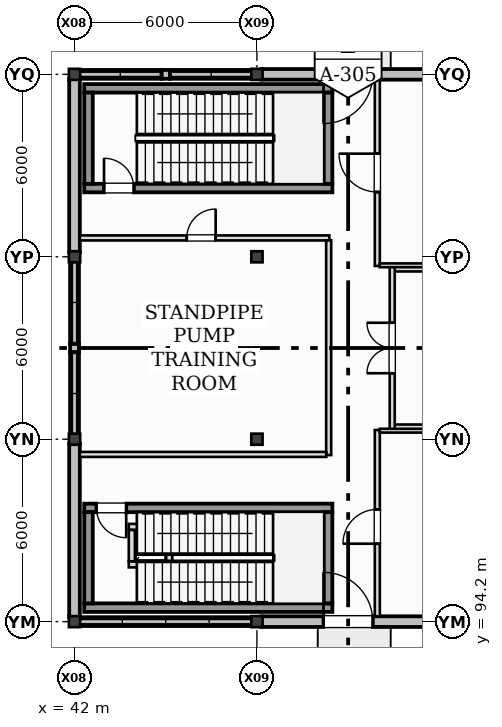
"""IFC4 building model, lengths in metres.
Left out: names, types, materials, properties, quantities, classifications, styles, units other than length and angle.
Written with IfcOpenShell. Run it as: python <this file> out.ifc"""

import sys

from ifc_helpers import new_model, si_unit, direction, frame, frame_2d, origin, origin_2d, place, context, subcontext, project, spatial, rectangle, i_section, extrude, element, fill, save


model = new_model("IFC4")
c1 = context("Model", 3, precision=1e-05, world=origin(), true_north=direction((0.0, 1.0)))
c2 = subcontext(c1, "Body", "Model", "MODEL_VIEW")
j1 = project(units=[si_unit("LENGTHUNIT", "METRE"), si_unit("PLANEANGLEUNIT", "RADIAN")], contexts=[c1])
p1 = place(None, origin())
s1 = spatial("IfcSite", under=j1, at=p1, CompositionType="ELEMENT")
p2 = place(p1, origin())
s2 = spatial("IfcBuilding", under=s1, at=p2, CompositionType="ELEMENT")
p3 = place(p2, origin())
s3 = spatial("IfcBuildingStorey", under=s2, at=p3, CompositionType="ELEMENT", Elevation=0.0)
for number, where, z_axis, x_axis in (
    (1, (42.0, 94.2, -0.41), (0.0, 0.0, 1.0), (1.0, 0.0, 0.0)),
    (2, (42.0, 100.2, -0.41), (0.0, 0.0, 1.0), (1.0, 0.0, 0.0)),
    (3, (42.0, 106.2, -0.41), (0.0, 0.0, 1.0), (1.0, 0.0, 0.0)),
    (4, (42.0, 112.2, -0.41), (0.0, 0.0, 1.0), (1.0, 0.0, 0.0)),
    (5, (48.0, 94.2, -0.41), (0.0, 0.0, 1.0), (1.0, 0.0, 0.0)),
    (6, (48.0, 100.2, -0.41), (0.0, 0.0, 1.0), (1.0, 0.0, 0.0)),
    (7, (48.0, 106.2, -0.41), (0.0, 0.0, 1.0), (1.0, 0.0, 0.0)),
    (8, (48.0, 112.2, -0.41), (0.0, 0.0, 1.0), (1.0, 0.0, 0.0)),
):
    element("IfcColumn", number, at=place(p3, frame(where, z_axis=z_axis, x_axis=x_axis)), inside=s3, PredefinedType="COLUMN", context=c2, shape_type="SweptSolid", body=[
        extrude(i_section(OverallWidth=0.371, OverallDepth=0.364, WebThickness=0.013, FlangeThickness=0.022, at=origin_2d()), origin(), (0.0, 0.0, 1.0), 6.41),
    ])
p4 = place(p3, frame((42.145, 94.2, 0.0), z_axis=(0.0, 0.0, 1.0), x_axis=(1.0, 0.0, 0.0)))
e9 = element("IfcWall", 9, at=p4, inside=s3, PredefinedType="STANDARD", context=c2, shape_type="SweptSolid", body=[
    extrude(rectangle(XDim=5.71, YDim=0.29, at=frame_2d((2.855, 0.0))), origin(), (0.0, 0.0, 1.0), 0.56),
])
p5 = place(p3, frame((48.145, 94.2, 0.0), z_axis=(0.0, 0.0, 1.0), x_axis=(1.0, 0.0, 0.0)))
e10 = element("IfcWall", 10, at=p5, inside=s3, PredefinedType="STANDARD", context=c2, shape_type="SweptSolid", body=[
    extrude(rectangle(XDim=5.71, YDim=0.35, at=frame_2d((2.855, 0.0))), origin(), (0.0, 0.0, 1.0), 5.113),
])
p6 = place(p5, frame((2.045, 0.0, 0.0)))
e11 = element("IfcOpeningElement", 11, at=p6, cuts=e10, PredefinedType="OPENING", context=c2, shape_type="SweptSolid", body=[
    extrude(rectangle(XDim=1.62, YDim=2.2, at=frame_2d((0.81, 1.1))), frame((0.0, 0.185, 0.0), z_axis=(0.0, -1.0, 0.0), x_axis=(1.0, 0.0, 0.0)), (0.0, 0.0, 1.0), 0.37),
])
p7 = place(p3, frame((45.14, 112.2, 0.0), z_axis=(0.0, 0.0, 1.0), x_axis=(-1.0, 0.0, 0.0)))
e12 = element("IfcWall", 12, at=p7, inside=s3, PredefinedType="STANDARD", context=c2, shape_type="SweptSolid", body=[
    extrude(rectangle(XDim=0.28, YDim=0.29, at=frame_2d((0.14, 0.0))), origin(), (0.0, 0.0, 1.0), 5.113),
])
p8 = place(p3, frame((47.855, 112.2, 0.0), z_axis=(0.0, 0.0, 1.0), x_axis=(-1.0, 0.0, 0.0)))
e13 = element("IfcWall", 13, at=p8, inside=s3, PredefinedType="STANDARD", context=c2, shape_type="SweptSolid", body=[
    extrude(rectangle(XDim=2.715, YDim=0.29, at=frame_2d((1.357, 0.0))), origin(), (0.0, 0.0, 1.0), 0.68),
])
p9 = place(p3, frame((44.86, 112.2, 0.0), z_axis=(0.0, 0.0, 1.0), x_axis=(-1.0, 0.0, 0.0)))
e14 = element("IfcWall", 14, at=p9, inside=s3, PredefinedType="STANDARD", context=c2, shape_type="SweptSolid", body=[
    extrude(rectangle(XDim=2.715, YDim=0.29, at=frame_2d((1.357, 0.0))), origin(), (0.0, 0.0, 1.0), 0.8),
])
p10 = place(p3, frame((53.855, 112.2, 0.0), z_axis=(0.0, 0.0, 1.0), x_axis=(-1.0, 0.0, 0.0)))
e15 = element("IfcWall", 15, at=p10, inside=s3, PredefinedType="STANDARD", context=c2, shape_type="SweptSolid", body=[
    extrude(rectangle(XDim=5.71, YDim=0.35, at=frame_2d((2.855, 0.0))), origin(), (0.0, 0.0, 1.0), 5.113),
])
p11 = place(p10, frame((2.045, 0.0, 0.0)))
e16 = element("IfcOpeningElement", 16, at=p11, cuts=e15, PredefinedType="OPENING", context=c2, shape_type="SweptSolid", body=[
    extrude(rectangle(XDim=1.62, YDim=2.2, at=frame_2d((0.81, 1.1))), frame((0.0, 0.185, 0.0), z_axis=(0.0, -1.0, 0.0), x_axis=(1.0, 0.0, 0.0)), (0.0, 0.0, 1.0), 0.37),
])
p12 = place(p3, frame((42.0, 100.055, 0.0), z_axis=(0.0, 0.0, 1.0), x_axis=(0.0, -1.0, 0.0)))
e17 = element("IfcWall", 17, at=p12, inside=s3, PredefinedType="STANDARD", context=c2, shape_type="SweptSolid", body=[
    extrude(rectangle(XDim=5.71, YDim=0.35, at=frame_2d((2.855, 0.0))), origin(), (0.0, 0.0, 1.0), 5.044),
])
p13 = place(p3, frame((42.0, 103.34, 0.0), z_axis=(0.0, 0.0, 1.0), x_axis=(0.0, -1.0, 0.0)))
e18 = element("IfcWall", 18, at=p13, inside=s3, PredefinedType="STANDARD", context=c2, shape_type="SweptSolid", body=[
    extrude(rectangle(XDim=0.28, YDim=0.29, at=frame_2d((0.14, 0.0))), origin(), (0.0, 0.0, 1.0), 5.044),
])
p14 = place(p3, frame((42.0, 106.055, 0.0), z_axis=(0.0, 0.0, 1.0), x_axis=(0.0, -1.0, 0.0)))
e19 = element("IfcWall", 19, at=p14, inside=s3, PredefinedType="STANDARD", context=c2, shape_type="SweptSolid", body=[
    extrude(rectangle(XDim=2.715, YDim=0.29, at=frame_2d((1.357, 0.0))), origin(), (0.0, 0.0, 1.0), 0.92),
])
p15 = place(p3, frame((42.0, 103.06, 0.0), z_axis=(0.0, 0.0, 1.0), x_axis=(0.0, -1.0, 0.0)))
e20 = element("IfcWall", 20, at=p15, inside=s3, PredefinedType="STANDARD", context=c2, shape_type="SweptSolid", body=[
    extrude(rectangle(XDim=2.715, YDim=0.29, at=frame_2d((1.357, 0.0))), origin(), (0.0, 0.0, 1.0), 0.32),
])
p16 = place(p3, frame((42.0, 112.055, 0.0), z_axis=(0.0, 0.0, 1.0), x_axis=(0.0, -1.0, 0.0)))
e21 = element("IfcWall", 21, at=p16, inside=s3, PredefinedType="STANDARD", context=c2, shape_type="SweptSolid", body=[
    extrude(rectangle(XDim=5.71, YDim=0.35, at=frame_2d((2.855, 0.0))), origin(), (0.0, 0.0, 1.0), 5.044),
])
p17 = place(p3, frame((42.32, 94.66, 0.0), z_axis=(0.0, 0.0, 1.0), x_axis=(1.0, 0.0, 0.0)))
e22 = element("IfcWall", 22, at=p17, inside=s3, PredefinedType="SHEAR", context=c2, shape_type="SweptSolid", body=[
    extrude(rectangle(XDim=8.16, YDim=0.28, at=frame_2d((4.08, 0.0))), origin(), (0.0, 0.0, 1.0), 6.0),
])
p18 = place(p3, frame((50.48, 97.94, 0.0), z_axis=(0.0, 0.0, 1.0), x_axis=(-1.0, 0.0, 0.0)))
e23 = element("IfcWall", 23, at=p18, inside=s3, PredefinedType="SHEAR", context=c2, shape_type="SweptSolid", body=[
    extrude(rectangle(XDim=8.16, YDim=0.28, at=frame_2d((4.08, 0.0))), origin(), (0.0, 0.0, 1.0), 6.0),
])
p19 = place(p18, frame((6.78, 0.0, 0.0)))
e24 = element("IfcOpeningElement", 24, at=p19, cuts=e23, PredefinedType="OPENING", context=c2, shape_type="SweptSolid", body=[
    extrude(rectangle(XDim=0.98, YDim=2.15, at=frame_2d((0.49, 1.075))), frame((0.0, 0.15, 0.0), z_axis=(0.0, -1.0, 0.0), x_axis=(1.0, 0.0, 0.0)), (0.0, 0.0, 1.0), 0.3),
])
for number, where, z_axis, x_axis in (
    (25, (42.46, 97.8, 0.0), (0.0, 0.0, 1.0), (0.0, -1.0, 0.0)),
    (26, (50.34, 94.8, 0.0), (0.0, 0.0, 1.0), (0.0, 1.0, 0.0)),
):
    element("IfcWall", number, at=place(p3, frame(where, z_axis=z_axis, x_axis=x_axis)), inside=s3, PredefinedType="SHEAR", context=c2, shape_type="SweptSolid", body=[
        extrude(rectangle(XDim=3.0, YDim=0.28, at=frame_2d((1.5, 0.0))), origin(), (0.0, 0.0, 1.0), 6.0),
    ])
p20 = place(p3, frame((42.32, 108.46, 0.0), z_axis=(0.0, 0.0, 1.0), x_axis=(1.0, 0.0, 0.0)))
e27 = element("IfcWall", 27, at=p20, inside=s3, PredefinedType="SHEAR", context=c2, shape_type="SweptSolid", body=[
    extrude(rectangle(XDim=8.16, YDim=0.28, at=frame_2d((4.08, 0.0))), origin(), (0.0, 0.0, 1.0), 6.0),
])
p21 = place(p20, frame((0.65, 0.0, 0.0)))
e28 = element("IfcOpeningElement", 28, at=p21, cuts=e27, PredefinedType="OPENING", context=c2, shape_type="SweptSolid", body=[
    extrude(rectangle(XDim=0.98, YDim=2.15, at=frame_2d((0.49, 1.075))), frame((0.0, 0.15, 0.0), z_axis=(0.0, -1.0, 0.0), x_axis=(1.0, 0.0, 0.0)), (0.0, 0.0, 1.0), 0.3),
])
p22 = place(p3, frame((50.48, 111.74, 0.0), z_axis=(0.0, 0.0, 1.0), x_axis=(-1.0, 0.0, 0.0)))
e29 = element("IfcWall", 29, at=p22, inside=s3, PredefinedType="SHEAR", context=c2, shape_type="SweptSolid", body=[
    extrude(rectangle(XDim=8.16, YDim=0.28, at=frame_2d((4.08, 0.0))), origin(), (0.0, 0.0, 1.0), 6.0),
])
for number, where, z_axis, x_axis in (
    (30, (42.46, 111.6, 0.0), (0.0, 0.0, 1.0), (0.0, -1.0, 0.0)),
    (31, (50.34, 108.6, 0.0), (0.0, 0.0, 1.0), (0.0, 1.0, 0.0)),
):
    element("IfcWall", number, at=place(p3, frame(where, z_axis=z_axis, x_axis=x_axis)), inside=s3, PredefinedType="SHEAR", context=c2, shape_type="SweptSolid", body=[
        extrude(rectangle(XDim=3.0, YDim=0.28, at=frame_2d((1.5, 0.0))), origin(), (0.0, 0.0, 1.0), 6.0),
    ])
for number, where, z_axis, x_axis in (
    (32, (52.45, 100.6, 0.0), (0.0, 0.0, 1.0), (1.0, 0.0, 0.0)),
    (33, (56.448, 105.8, 0.0), (0.0, 0.0, 1.0), (-1.0, 0.0, 0.0)),
):
    element("IfcWall", number, at=place(p3, frame(where, z_axis=z_axis, x_axis=x_axis)), inside=s3, PredefinedType="PARTITIONING", context=c2, shape_type="SweptSolid", body=[
        extrude(rectangle(XDim=3.998, YDim=0.165, at=frame_2d((1.999, 0.0))), origin(), (0.0, 0.0, 1.0), 5.68),
    ])
p23 = place(p3, frame((52.45, 100.52, 0.0), z_axis=(0.0, 0.0, 1.0), x_axis=(0.0, 1.0, 0.0)))
e34 = element("IfcWall", 34, at=p23, inside=s3, PredefinedType="PARTITIONING", context=c2, shape_type="SweptSolid", body=[
    extrude(rectangle(XDim=5.36, YDim=0.165, at=frame_2d((2.68, 0.0))), origin(), (0.0, 0.0, 1.0), 5.68),
])
p24 = place(p23, frame((1.85, 0.0, 0.0)))
e35 = element("IfcOpeningElement", 35, at=p24, cuts=e34, PredefinedType="OPENING", context=c2, shape_type="SweptSolid", body=[
    extrude(rectangle(XDim=1.66, YDim=2.2, at=frame_2d((0.83, 1.1))), frame((0.0, 0.093, 0.0), z_axis=(0.0, -1.0, 0.0), x_axis=(1.0, 0.0, 0.0)), (0.0, 0.0, 1.0), 0.185),
])
p25 = place(p3, frame((43.785, 96.085, 0.0), z_axis=(0.0, 0.0, 1.0), x_axis=(1.0, 0.0, 0.0)))
e36 = element("IfcWall", 36, at=p25, inside=s3, PredefinedType="PARTITIONING", context=c2, shape_type="SweptSolid", body=[
    extrude(rectangle(XDim=1.43, YDim=0.2, at=frame_2d((0.715, 0.0))), origin(), (0.0, 0.0, 1.0), 5.68),
])
p26 = place(p3, frame((45.115, 96.185, 0.0), z_axis=(0.0, 0.0, 1.0), x_axis=(0.0, 1.0, 0.0)))
e37 = element("IfcWall", 37, at=p26, inside=s3, PredefinedType="PARTITIONING", context=c2, shape_type="SweptSolid", body=[
    extrude(rectangle(XDim=1.03, YDim=0.2, at=frame_2d((0.515, 0.0))), origin(), (0.0, 0.0, 1.0), 5.68),
])
p27 = place(p3, frame((45.215, 97.315, 0.0), z_axis=(0.0, 0.0, 1.0), x_axis=(-1.0, 0.0, 0.0)))
e38 = element("IfcWall", 38, at=p27, inside=s3, PredefinedType="PARTITIONING", context=c2, shape_type="SweptSolid", body=[
    extrude(rectangle(XDim=1.43, YDim=0.2, at=frame_2d((0.715, 0.0))), origin(), (0.0, 0.0, 1.0), 5.68),
])
p28 = place(p3, frame((43.885, 97.215, 0.0), z_axis=(0.0, 0.0, 1.0), x_axis=(0.0, -1.0, 0.0)))
e39 = element("IfcWall", 39, at=p28, inside=s3, PredefinedType="PARTITIONING", context=c2, shape_type="SweptSolid", body=[
    extrude(rectangle(XDim=1.03, YDim=0.2, at=frame_2d((0.515, 0.0))), origin(), (0.0, 0.0, 1.0), 5.451),
])
p29 = place(p3, frame((42.175, 106.82, 0.0), z_axis=(0.0, 0.0, 1.0), x_axis=(1.0, 0.0, 0.0)))
e40 = element("IfcWall", 40, at=p29, inside=s3, PredefinedType="PARTITIONING", context=c2, shape_type="SweptSolid", body=[
    extrude(rectangle(XDim=8.208, YDim=0.165, at=frame_2d((4.104, 0.0))), origin(), (0.0, 0.0, 1.0), 5.68),
])
p30 = place(p29, frame((3.517, 0.0, 0.0)))
e41 = element("IfcOpeningElement", 41, at=p30, cuts=e40, PredefinedType="OPENING", context=c2, shape_type="SweptSolid", body=[
    extrude(rectangle(XDim=0.95, YDim=2.12, at=frame_2d((0.475, 1.06))), frame((0.0, 0.093, 0.0), z_axis=(0.0, -1.0, 0.0), x_axis=(1.0, 0.0, 0.0)), (0.0, 0.0, 1.0), 0.185),
])
p31 = place(p3, frame((50.36, 106.74, 0.0), z_axis=(0.0, 0.0, 1.0), x_axis=(0.0, -1.0, 0.0)))
e42 = element("IfcWall", 42, at=p31, inside=s3, PredefinedType="PARTITIONING", context=c2, shape_type="SweptSolid", body=[
    extrude(rectangle(XDim=7.062, YDim=0.165, at=frame_2d((3.531, 0.0))), origin(), (0.0, 0.0, 1.0), 5.68),
])
p32 = place(p3, frame((50.28, 99.7, 0.0), z_axis=(0.0, 0.0, 1.0), x_axis=(-1.0, 0.0, 0.0)))
e43 = element("IfcWall", 43, at=p32, inside=s3, PredefinedType="PARTITIONING", context=c2, shape_type="SweptSolid", body=[
    extrude(rectangle(XDim=8.105, YDim=0.165, at=frame_2d((4.052, 0.0))), origin(), (0.0, 0.0, 1.0), 5.68),
])
p33 = place(p3, frame((51.96, 94.375, 0.0), z_axis=(0.0, 0.0, 1.0), x_axis=(0.0, 1.0, 0.0)))
e44 = element("IfcWall", 44, at=p33, inside=s3, PredefinedType="PARTITIONING", context=c2, shape_type="SweptSolid", body=[
    extrude(rectangle(XDim=6.127, YDim=0.165, at=frame_2d((3.064, 0.0))), origin(), (0.0, 0.0, 1.0), 5.249),
])
p34 = place(p33, frame((2.387, 0.0, 0.0)))
e45 = element("IfcOpeningElement", 45, at=p34, cuts=e44, PredefinedType="OPENING", context=c2, shape_type="SweptSolid", body=[
    extrude(rectangle(XDim=1.13, YDim=2.18, at=frame_2d((0.565, 1.09))), frame((0.0, 0.093, 0.0), z_axis=(0.0, -1.0, 0.0), x_axis=(1.0, 0.0, 0.0)), (0.0, 0.0, 1.0), 0.185),
])
p35 = place(p3, frame((52.04, 100.48, 0.0), z_axis=(0.0, 0.0, 1.0), x_axis=(1.0, 0.0, 0.0)))
e46 = element("IfcWall", 46, at=p35, inside=s3, PredefinedType="PARTITIONING", context=c2, shape_type="SweptSolid", body=[
    extrude(rectangle(XDim=7.815, YDim=0.125, at=frame_2d((3.907, 0.0))), origin(), (0.0, 0.0, 1.0), 5.113),
])
p36 = place(p3, frame((51.96, 105.897, 0.0), z_axis=(0.0, 0.0, 1.0), x_axis=(0.0, 1.0, 0.0)))
e47 = element("IfcWall", 47, at=p36, inside=s3, PredefinedType="PARTITIONING", context=c2, shape_type="SweptSolid", body=[
    extrude(rectangle(XDim=6.127, YDim=0.165, at=frame_2d((3.064, 0.0))), origin(), (0.0, 0.0, 1.0), 5.249),
])
p37 = place(p36, frame((2.434, 0.0, 0.0)))
e48 = element("IfcOpeningElement", 48, at=p37, cuts=e47, PredefinedType="OPENING", context=c2, shape_type="SweptSolid", body=[
    extrude(rectangle(XDim=1.26, YDim=2.2, at=frame_2d((0.63, 1.1))), frame((0.0, 0.093, 0.0), z_axis=(0.0, -1.0, 0.0), x_axis=(1.0, 0.0, 0.0)), (0.0, 0.0, 1.0), 0.185),
])
p38 = place(p3, frame((59.855, 105.92, 0.0), z_axis=(0.0, 0.0, 1.0), x_axis=(-1.0, 0.0, 0.0)))
e49 = element("IfcWall", 49, at=p38, inside=s3, PredefinedType="PARTITIONING", context=c2, shape_type="SweptSolid", body=[
    extrude(rectangle(XDim=7.815, YDim=0.125, at=frame_2d((3.907, 0.0))), origin(), (0.0, 0.0, 1.0), 5.113),
])
p39 = place(p6, frame((1.62, 0.0, 0.0), z_axis=(0.0, 0.0, 1.0), x_axis=(-1.0, 0.0, 0.0)))
e50 = element("IfcDoor", 50, at=p39, inside=s3, OperationType="SINGLE_SWING_LEFT", PredefinedType="DOOR", context=c2, shape_type="SweptSolid", body=[
    extrude(rectangle(XDim=1.62, YDim=2.2, at=frame_2d((0.81, 1.1))), frame((0.0, 0.025, 0.0), z_axis=(0.0, -1.0, 0.0), x_axis=(1.0, 0.0, 0.0)), (0.0, 0.0, 1.0), 0.05),
])
fill(e11, e50)
p40 = place(p11, frame((1.62, 0.0, 0.0), z_axis=(0.0, 0.0, 1.0), x_axis=(-1.0, 0.0, 0.0)))
e51 = element("IfcDoor", 51, at=p40, inside=s3, OperationType="SINGLE_SWING_RIGHT", PredefinedType="DOOR", context=c2, shape_type="SweptSolid", body=[
    extrude(rectangle(XDim=1.62, YDim=2.2, at=frame_2d((0.81, 1.1))), frame((0.0, 0.025, 0.0), z_axis=(0.0, -1.0, 0.0), x_axis=(1.0, 0.0, 0.0)), (0.0, 0.0, 1.0), 0.05),
])
fill(e16, e51)
p41 = place(p19, origin())
e52 = element("IfcDoor", 52, at=p41, inside=s3, OperationType="SINGLE_SWING_LEFT", PredefinedType="DOOR", context=c2, shape_type="SweptSolid", body=[
    extrude(rectangle(XDim=0.98, YDim=2.15, at=frame_2d((0.49, 1.075))), frame((0.0, 0.025, 0.0), z_axis=(0.0, -1.0, 0.0), x_axis=(1.0, 0.0, 0.0)), (0.0, 0.0, 1.0), 0.05),
])
fill(e24, e52)
p42 = place(p21, origin())
e53 = element("IfcDoor", 53, at=p42, inside=s3, OperationType="SINGLE_SWING_LEFT", PredefinedType="DOOR", context=c2, shape_type="SweptSolid", body=[
    extrude(rectangle(XDim=0.98, YDim=2.15, at=frame_2d((0.49, 1.075))), frame((0.0, 0.025, 0.0), z_axis=(0.0, -1.0, 0.0), x_axis=(1.0, 0.0, 0.0)), (0.0, 0.0, 1.0), 0.05),
])
fill(e28, e53)
p43 = place(p24, frame((1.66, 0.0, 0.0), z_axis=(0.0, 0.0, 1.0), x_axis=(-1.0, 0.0, 0.0)))
e54 = element("IfcDoor", 54, at=p43, inside=s3, OperationType="DOUBLE_DOOR_SINGLE_SWING", PredefinedType="DOOR", context=c2, shape_type="SweptSolid", body=[
    extrude(rectangle(XDim=1.66, YDim=2.2, at=frame_2d((0.83, 1.1))), frame((0.0, 0.025, 0.0), z_axis=(0.0, -1.0, 0.0), x_axis=(1.0, 0.0, 0.0)), (0.0, 0.0, 1.0), 0.05),
])
fill(e35, e54)
p44 = place(p30, frame((0.95, 0.0, 0.0), z_axis=(0.0, 0.0, 1.0), x_axis=(-1.0, 0.0, 0.0)))
e55 = element("IfcDoor", 55, at=p44, inside=s3, OperationType="SINGLE_SWING_RIGHT", PredefinedType="DOOR", context=c2, shape_type="SweptSolid", body=[
    extrude(rectangle(XDim=0.95, YDim=2.12, at=frame_2d((0.475, 1.06))), frame((0.0, 0.025, 0.0), z_axis=(0.0, -1.0, 0.0), x_axis=(1.0, 0.0, 0.0)), (0.0, 0.0, 1.0), 0.05),
])
fill(e41, e55)
p45 = place(p34, frame((1.13, 0.0, 0.0), z_axis=(0.0, 0.0, 1.0), x_axis=(-1.0, 0.0, 0.0)))
e56 = element("IfcDoor", 56, at=p45, inside=s3, OperationType="SINGLE_SWING_LEFT", PredefinedType="DOOR", context=c2, shape_type="SweptSolid", body=[
    extrude(rectangle(XDim=1.13, YDim=2.18, at=frame_2d((0.565, 1.09))), frame((0.0, 0.025, 0.0), z_axis=(0.0, -1.0, 0.0), x_axis=(1.0, 0.0, 0.0)), (0.0, 0.0, 1.0), 0.05),
])
fill(e45, e56)
p46 = place(p37, frame((1.26, 0.0, 0.0), z_axis=(0.0, 0.0, 1.0), x_axis=(-1.0, 0.0, 0.0)))
e57 = element("IfcDoor", 57, at=p46, inside=s3, OperationType="SINGLE_SWING_RIGHT", PredefinedType="DOOR", context=c2, shape_type="SweptSolid", body=[
    extrude(rectangle(XDim=1.26, YDim=2.2, at=frame_2d((0.63, 1.1))), frame((0.0, 0.025, 0.0), z_axis=(0.0, -1.0, 0.0), x_axis=(1.0, 0.0, 0.0)), (0.0, 0.0, 1.0), 0.05),
])
fill(e48, e57)
save(model, sys.argv[1])
